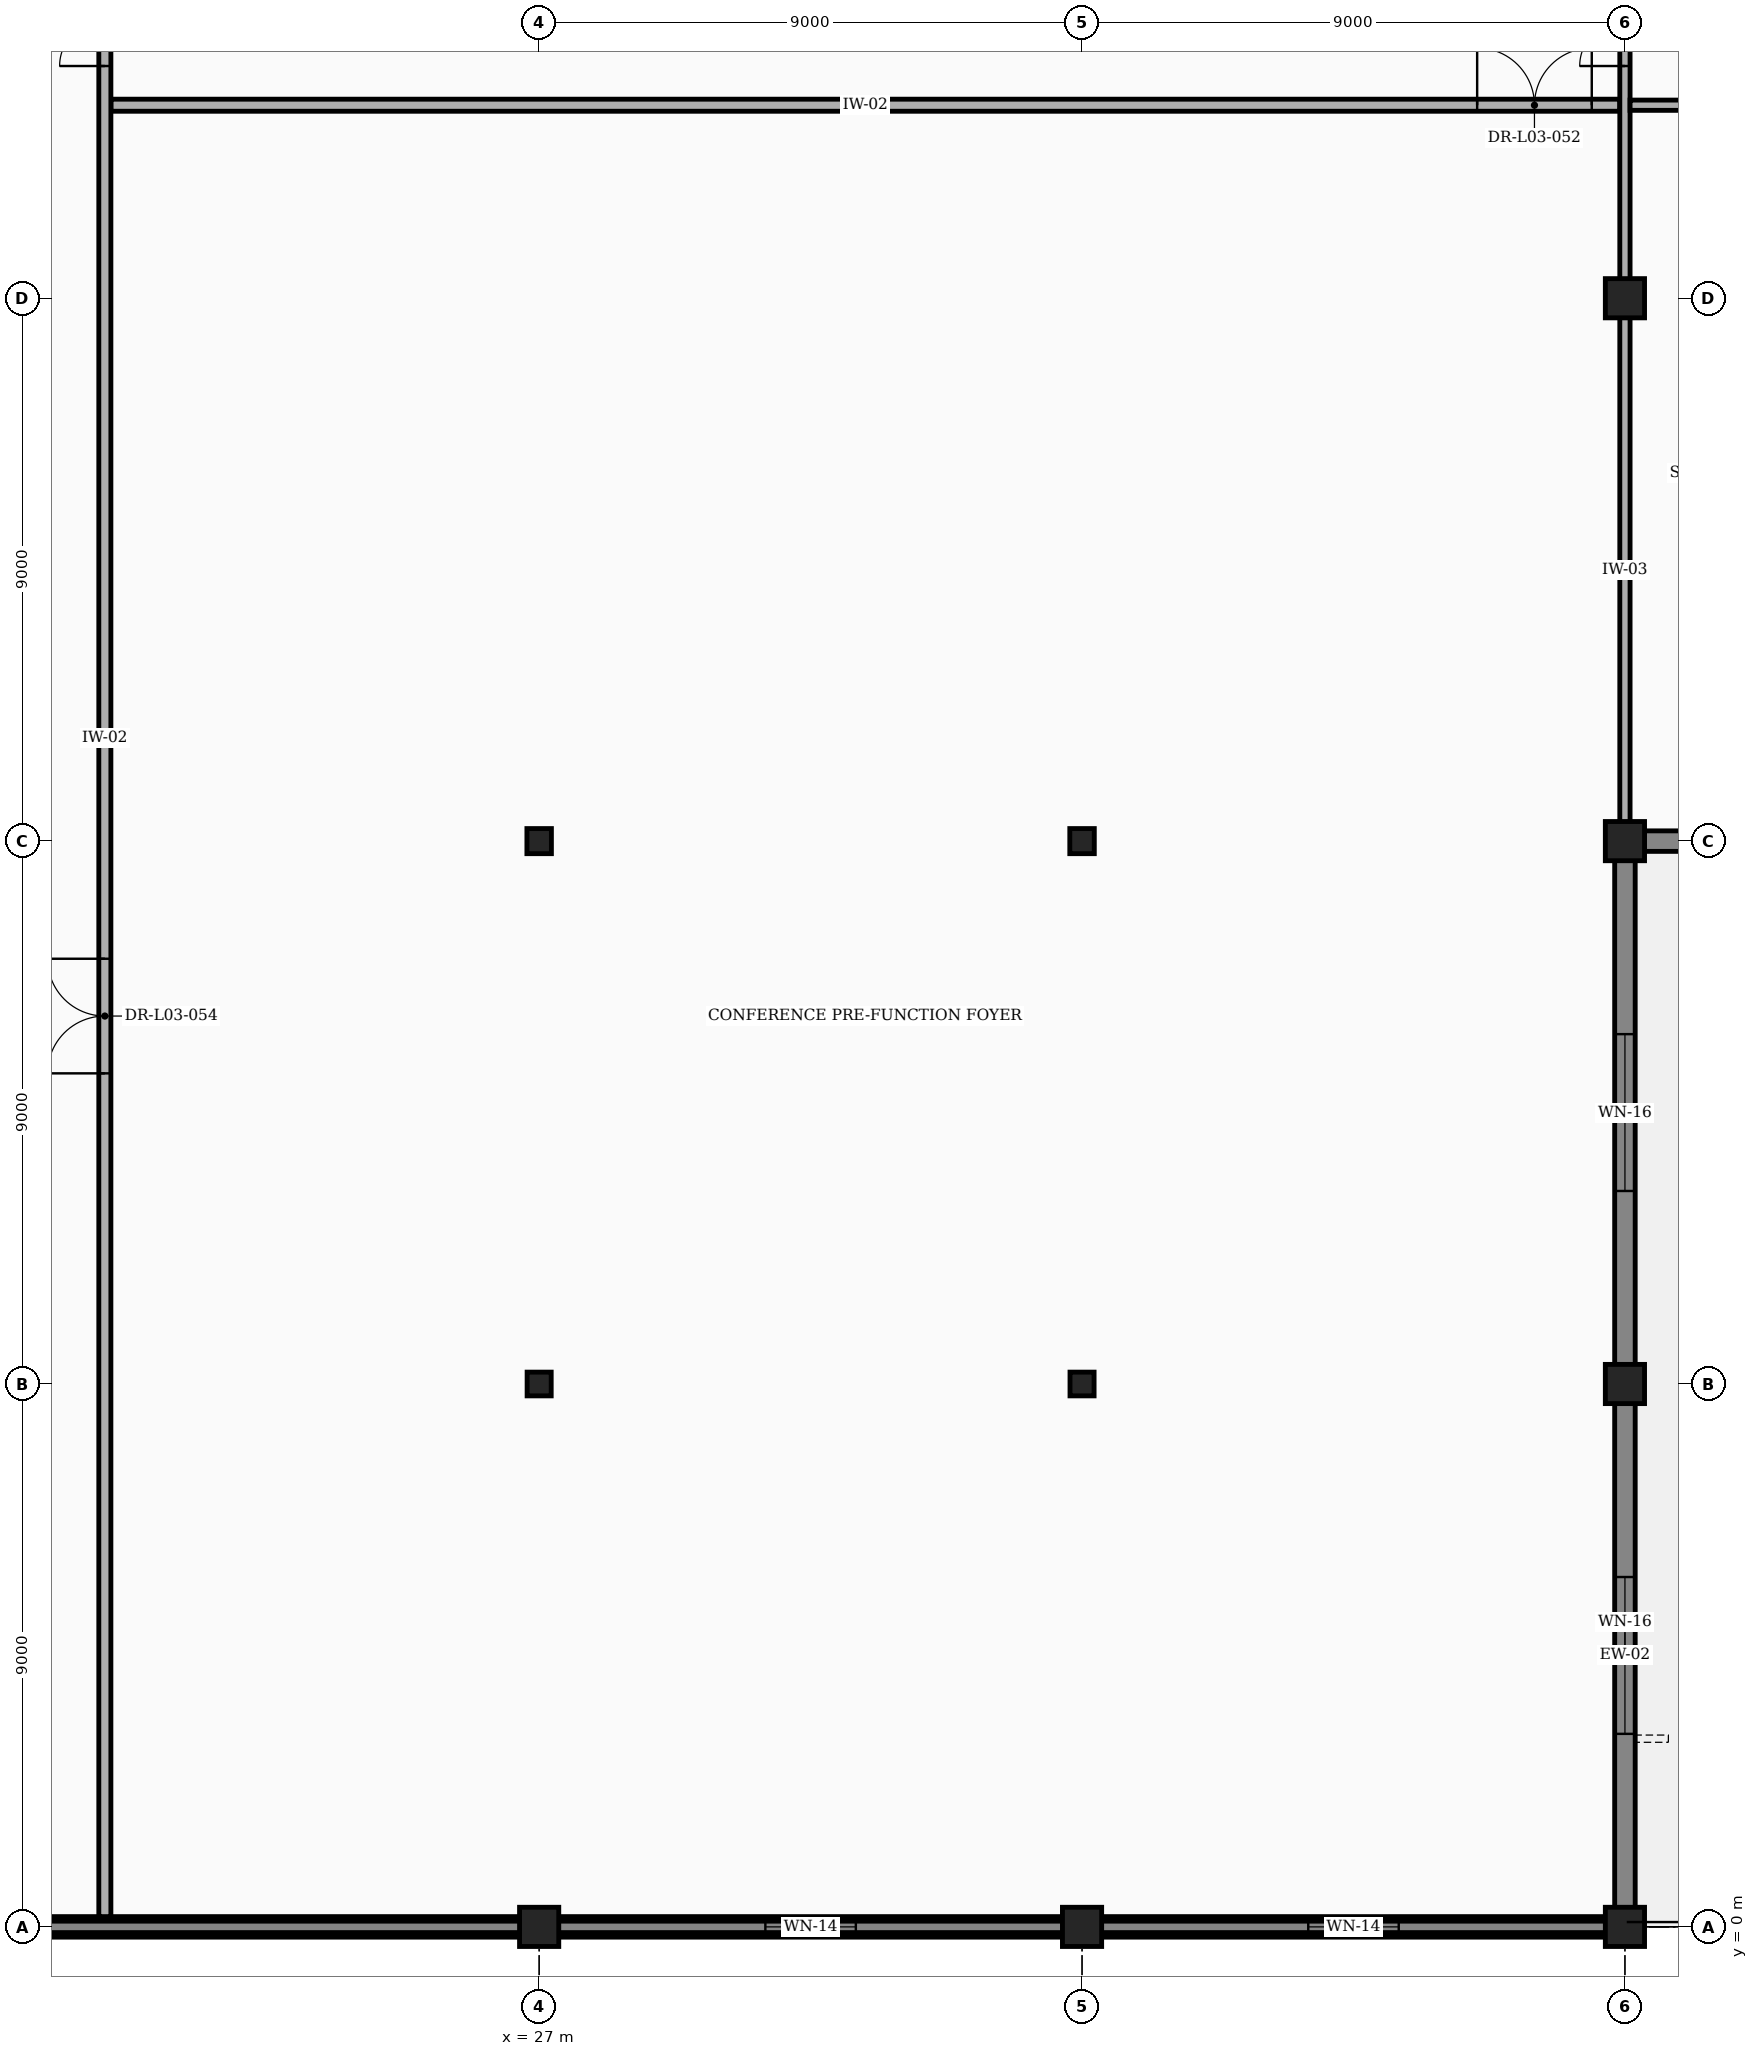
"""IFC4 building model, lengths in metres.
Left out: names, types, materials, properties, quantities, classifications, styles, units other than length and angle.
Written with IfcOpenShell. Run it as: python <this file> out.ifc"""

import sys

from ifc_helpers import new_model, si_unit, direction, frame, frame_2d, origin, origin_2d, place, context, subcontext, project, spatial, rectangle, i_section, extrude, element, fill, save


model = new_model("IFC4")
c1 = context("Model", 3, precision=1e-05, world=origin(), true_north=direction((0.0, 1.0)))
c2 = subcontext(c1, "Body", "Model", "MODEL_VIEW")
j1 = project(units=[si_unit("LENGTHUNIT", "METRE"), si_unit("PLANEANGLEUNIT", "RADIAN")], contexts=[c1])
p1 = place(None, origin())
s1 = spatial("IfcSite", under=j1, at=p1, CompositionType="ELEMENT")
p2 = place(p1, origin())
s2 = spatial("IfcBuilding", under=s1, at=p2, CompositionType="ELEMENT")
p3 = place(p2, frame((0.0, 0.0, 16.8)))
s3 = spatial("IfcBuildingStorey", under=s2, at=p3, CompositionType="ELEMENT", Elevation=16.8)
p4 = place(p3, frame((27.0, 0.0, 0.0), z_axis=(0.0, 0.0, 1.0), x_axis=(1.0, 0.0, 0.0)))
e1 = element("IfcColumn", 1, at=p4, inside=s3, PredefinedType="COLUMN", context=c2, shape_type="SweptSolid", body=[
    extrude(rectangle(XDim=0.65, YDim=0.65, at=origin_2d()), origin(), (0.0, 0.0, 1.0), 4.8),
])
p5 = place(p3, frame((27.0, 9.0, 0.0), z_axis=(0.0, 0.0, 1.0), x_axis=(1.0, 0.0, 0.0)))
e2 = element("IfcColumn", 2, at=p5, inside=s3, PredefinedType="COLUMN", context=c2, shape_type="SweptSolid", body=[
    extrude(i_section(OverallWidth=0.399, OverallDepth=0.394, WebThickness=0.023, FlangeThickness=0.037, at=origin_2d()), origin(), (0.0, 0.0, 1.0), 4.8),
])
p6 = place(p3, frame((27.0, 18.0, 0.0), z_axis=(0.0, 0.0, 1.0), x_axis=(1.0, 0.0, 0.0)))
e3 = element("IfcColumn", 3, at=p6, inside=s3, PredefinedType="COLUMN", context=c2, shape_type="SweptSolid", body=[
    extrude(i_section(OverallWidth=0.406, OverallDepth=0.416, WebThickness=0.03, FlangeThickness=0.048, at=origin_2d()), origin(), (0.0, 0.0, 1.0), 4.8),
])
p7 = place(p3, frame((36.0, 0.0, 0.0), z_axis=(0.0, 0.0, 1.0), x_axis=(1.0, 0.0, 0.0)))
e4 = element("IfcColumn", 4, at=p7, inside=s3, PredefinedType="COLUMN", context=c2, shape_type="SweptSolid", body=[
    extrude(rectangle(XDim=0.65, YDim=0.65, at=origin_2d()), origin(), (0.0, 0.0, 1.0), 4.8),
])
p8 = place(p3, frame((36.0, 9.0, 0.0), z_axis=(0.0, 0.0, 1.0), x_axis=(1.0, 0.0, 0.0)))
e5 = element("IfcColumn", 5, at=p8, inside=s3, PredefinedType="COLUMN", context=c2, shape_type="SweptSolid", body=[
    extrude(i_section(OverallWidth=0.399, OverallDepth=0.394, WebThickness=0.023, FlangeThickness=0.037, at=origin_2d()), origin(), (0.0, 0.0, 1.0), 4.8),
])
p9 = place(p3, frame((36.0, 18.0, 0.0), z_axis=(0.0, 0.0, 1.0), x_axis=(1.0, 0.0, 0.0)))
e6 = element("IfcColumn", 6, at=p9, inside=s3, PredefinedType="COLUMN", context=c2, shape_type="SweptSolid", body=[
    extrude(i_section(OverallWidth=0.406, OverallDepth=0.416, WebThickness=0.03, FlangeThickness=0.048, at=origin_2d()), origin(), (0.0, 0.0, 1.0), 4.8),
])
for number, where, z_axis, x_axis in (
    (7, (45.0, 0.0, 0.0), (0.0, 0.0, 1.0), (1.0, 0.0, 0.0)),
    (8, (45.0, 9.0, 0.0), (0.0, 0.0, 1.0), (1.0, 0.0, 0.0)),
    (9, (45.0, 18.0, 0.0), (0.0, 0.0, 1.0), (1.0, 0.0, 0.0)),
    (10, (45.0, 27.0, 0.0), (0.0, 0.0, 1.0), (1.0, 0.0, 0.0)),
):
    element("IfcColumn", number, at=place(p3, frame(where, z_axis=z_axis, x_axis=x_axis)), inside=s3, PredefinedType="COLUMN", context=c2, shape_type="SweptSolid", body=[
        extrude(rectangle(XDim=0.65, YDim=0.65, at=origin_2d()), origin(), (0.0, 0.0, 1.0), 4.8),
    ])
p10 = place(p3, frame((9.317, 0.0, 0.0), z_axis=(0.0, 0.0, 1.0), x_axis=(1.0, 0.0, 0.0)))
e11 = element("IfcWall", 11, at=p10, inside=s3, PredefinedType="STANDARD", context=c2, shape_type="SweptSolid", body=[
    extrude(rectangle(XDim=17.366, YDim=0.34, at=frame_2d((8.683, 0.0))), origin(), (0.0, 0.0, 1.0), 4.048),
])
p11 = place(p10, frame((7.933, 0.0, 0.85)))
e12 = element("IfcOpeningElement", 12, at=p11, cuts=e11, PredefinedType="OPENING", context=c2, shape_type="SweptSolid", body=[
    extrude(rectangle(XDim=1.5, YDim=1.8, at=frame_2d((0.75, 0.9))), frame((0.0, 0.182, 0.0), z_axis=(0.0, -1.0, 0.0), x_axis=(1.0, 0.0, 0.0)), (0.0, 0.0, 1.0), 0.364),
])
p12 = place(p3, frame((27.317, 0.0, 0.0), z_axis=(0.0, 0.0, 1.0), x_axis=(1.0, 0.0, 0.0)))
e13 = element("IfcWall", 13, at=p12, inside=s3, PredefinedType="STANDARD", context=c2, shape_type="SweptSolid", body=[
    extrude(rectangle(XDim=8.366, YDim=0.34, at=frame_2d((4.183, 0.0))), origin(), (0.0, 0.0, 1.0), 4.048),
])
p13 = place(p12, frame((3.433, 0.0, 0.85)))
e14 = element("IfcOpeningElement", 14, at=p13, cuts=e13, PredefinedType="OPENING", context=c2, shape_type="SweptSolid", body=[
    extrude(rectangle(XDim=1.5, YDim=1.8, at=frame_2d((0.75, 0.9))), frame((0.0, 0.182, 0.0), z_axis=(0.0, -1.0, 0.0), x_axis=(1.0, 0.0, 0.0)), (0.0, 0.0, 1.0), 0.364),
])
p14 = place(p3, frame((36.317, 0.0, 0.0), z_axis=(0.0, 0.0, 1.0), x_axis=(1.0, 0.0, 0.0)))
e15 = element("IfcWall", 15, at=p14, inside=s3, PredefinedType="STANDARD", context=c2, shape_type="SweptSolid", body=[
    extrude(rectangle(XDim=8.366, YDim=0.34, at=frame_2d((4.183, 0.0))), origin(), (0.0, 0.0, 1.0), 4.048),
])
p15 = place(p14, frame((3.433, 0.0, 0.85)))
e16 = element("IfcOpeningElement", 16, at=p15, cuts=e15, PredefinedType="OPENING", context=c2, shape_type="SweptSolid", body=[
    extrude(rectangle(XDim=1.5, YDim=1.8, at=frame_2d((0.75, 0.9))), frame((0.0, 0.182, 0.0), z_axis=(0.0, -1.0, 0.0), x_axis=(1.0, 0.0, 0.0)), (0.0, 0.0, 1.0), 0.364),
])
p16 = place(p3, frame((45.317, 18.0, 0.0), z_axis=(0.0, 0.0, 1.0), x_axis=(1.0, 0.0, 0.0)))
e17 = element("IfcWall", 17, at=p16, inside=s3, PredefinedType="STANDARD", context=c2, shape_type="SweptSolid", body=[
    extrude(rectangle(XDim=17.366, YDim=0.34, at=frame_2d((8.683, 0.0))), origin(), (0.0, 0.0, 1.0), 4.195),
])
p17 = place(p16, frame((7.933, 0.0, 0.85)))
e18 = element("IfcOpeningElement", 18, at=p17, cuts=e17, PredefinedType="OPENING", context=c2, shape_type="SweptSolid", body=[
    extrude(rectangle(XDim=1.5, YDim=1.8, at=frame_2d((0.75, 0.9))), frame((0.0, 0.182, 0.0), z_axis=(0.0, -1.0, 0.0), x_axis=(1.0, 0.0, 0.0)), (0.0, 0.0, 1.0), 0.364),
])
p18 = place(p16, frame((1.483, 0.0, 0.0)))
e19 = element("IfcOpeningElement", 19, at=p18, cuts=e17, PredefinedType="OPENING", context=c2, shape_type="SweptSolid", body=[
    extrude(rectangle(XDim=2.4, YDim=2.35, at=frame_2d((1.2, 1.175))), frame((0.0, 0.182, 0.0), z_axis=(0.0, -1.0, 0.0), x_axis=(1.0, 0.0, 0.0)), (0.0, 0.0, 1.0), 0.364),
])
p19 = place(p3, frame((45.0, 0.317, 0.0), z_axis=(0.0, 0.0, 1.0), x_axis=(0.0, 1.0, 0.0)))
e20 = element("IfcWall", 20, at=p19, inside=s3, PredefinedType="STANDARD", context=c2, shape_type="SweptSolid", body=[
    extrude(rectangle(XDim=8.366, YDim=0.34, at=frame_2d((4.183, 0.0))), origin(), (0.0, 0.0, 1.0), 4.048),
])
p20 = place(p19, frame((2.883, 0.0, 0.85)))
e21 = element("IfcOpeningElement", 21, at=p20, cuts=e20, PredefinedType="OPENING", context=c2, shape_type="SweptSolid", body=[
    extrude(rectangle(XDim=2.6, YDim=2.2, at=frame_2d((1.3, 1.1))), frame((0.0, 0.182, 0.0), z_axis=(0.0, -1.0, 0.0), x_axis=(1.0, 0.0, 0.0)), (0.0, 0.0, 1.0), 0.364),
])
p21 = place(p3, frame((45.0, 9.317, 0.0), z_axis=(0.0, 0.0, 1.0), x_axis=(0.0, 1.0, 0.0)))
e22 = element("IfcWall", 22, at=p21, inside=s3, PredefinedType="STANDARD", context=c2, shape_type="SweptSolid", body=[
    extrude(rectangle(XDim=8.366, YDim=0.34, at=frame_2d((4.183, 0.0))), origin(), (0.0, 0.0, 1.0), 4.555),
])
p22 = place(p21, frame((2.883, 0.0, 0.85)))
e23 = element("IfcOpeningElement", 23, at=p22, cuts=e22, PredefinedType="OPENING", context=c2, shape_type="SweptSolid", body=[
    extrude(rectangle(XDim=2.6, YDim=2.2, at=frame_2d((1.3, 1.1))), frame((0.0, 0.182, 0.0), z_axis=(0.0, -1.0, 0.0), x_axis=(1.0, 0.0, 0.0)), (0.0, 0.0, 1.0), 0.364),
])
p23 = place(p3, frame((0.0, 0.0, 4.8), z_axis=(0.0, 0.0, 1.0), x_axis=(1.0, 0.0, 0.0)))
e24 = element("IfcWall", 24, at=p23, inside=s3, PredefinedType="PARAPET", context=c2, shape_type="SweptSolid", body=[
    extrude(rectangle(XDim=45.0, YDim=0.19, at=frame_2d((22.5, 0.0))), origin(), (0.0, 0.0, 1.0), 1.2),
])
p24 = place(p3, frame((19.9, 30.2, 0.0), z_axis=(0.0, 0.0, 1.0), x_axis=(1.0, 0.0, 0.0)))
e25 = element("IfcWall", 25, at=p24, inside=s3, PredefinedType="PARTITIONING", context=c2, shape_type="SweptSolid", body=[
    extrude(rectangle(XDim=25.015, YDim=0.2, at=frame_2d((12.508, 0.0))), origin(), (0.0, 0.0, 1.0), 4.555),
])
p25 = place(p24, frame((22.65, 0.0, 0.0)))
e26 = element("IfcOpeningElement", 26, at=p25, cuts=e25, PredefinedType="OPENING", context=c2, shape_type="SweptSolid", body=[
    extrude(rectangle(XDim=1.9, YDim=2.35, at=frame_2d((0.95, 1.175))), frame((0.0, 0.112, 0.0), z_axis=(0.0, -1.0, 0.0), x_axis=(1.0, 0.0, 0.0)), (0.0, 0.0, 1.0), 0.224),
])
p26 = place(p3, frame((19.8, 0.17, 0.0), z_axis=(0.0, 0.0, 1.0), x_axis=(0.0, 1.0, 0.0)))
e27 = element("IfcWall", 27, at=p26, inside=s3, PredefinedType="PARTITIONING", context=c2, shape_type="SweptSolid", body=[
    extrude(rectangle(XDim=39.07, YDim=0.2, at=frame_2d((19.535, 0.0))), origin(), (0.0, 0.0, 1.0), 4.555),
])
p27 = place(p26, frame((13.98, 0.0, 0.0)))
e28 = element("IfcOpeningElement", 28, at=p27, cuts=e27, PredefinedType="OPENING", context=c2, shape_type="SweptSolid", body=[
    extrude(rectangle(XDim=1.9, YDim=2.35, at=frame_2d((0.95, 1.175))), frame((0.0, 0.112, 0.0), z_axis=(0.0, -1.0, 0.0), x_axis=(1.0, 0.0, 0.0)), (0.0, 0.0, 1.0), 0.224),
])
p28 = place(p26, frame((30.68, 0.0, 0.0)))
e29 = element("IfcOpeningElement", 29, at=p28, cuts=e27, PredefinedType="OPENING", context=c2, shape_type="SweptSolid", body=[
    extrude(rectangle(XDim=1.5, YDim=2.2, at=frame_2d((0.75, 1.1))), frame((0.0, 0.112, 0.0), z_axis=(0.0, -1.0, 0.0), x_axis=(1.0, 0.0, 0.0)), (0.0, 0.0, 1.0), 0.224),
])
p29 = place(p26, frame((36.68, 0.0, 0.0)))
e30 = element("IfcOpeningElement", 30, at=p29, cuts=e27, PredefinedType="OPENING", context=c2, shape_type="SweptSolid", body=[
    extrude(rectangle(XDim=1.9, YDim=2.35, at=frame_2d((0.95, 1.175))), frame((0.0, 0.112, 0.0), z_axis=(0.0, -1.0, 0.0), x_axis=(1.0, 0.0, 0.0)), (0.0, 0.0, 1.0), 0.224),
])
p30 = place(p3, frame((45.0, 18.22, 0.0), z_axis=(0.0, 0.0, 1.0), x_axis=(0.0, 1.0, 0.0)))
e31 = element("IfcWall", 31, at=p30, inside=s3, PredefinedType="PARTITIONING", context=c2, shape_type="SweptSolid", body=[
    extrude(rectangle(XDim=8.56, YDim=0.17, at=frame_2d((4.28, 0.0))), origin(), (0.0, 0.0, 1.0), 4.002),
])
p31 = place(p3, frame((45.0, 27.22, 0.0), z_axis=(0.0, 0.0, 1.0), x_axis=(0.0, 1.0, 0.0)))
e32 = element("IfcWall", 32, at=p31, inside=s3, PredefinedType="PARTITIONING", context=c2, shape_type="SweptSolid", body=[
    extrude(rectangle(XDim=8.56, YDim=0.17, at=frame_2d((4.28, 0.0))), origin(), (0.0, 0.0, 1.0), 4.258),
])
p32 = place(p31, frame((3.63, 0.0, 0.0)))
e33 = element("IfcOpeningElement", 33, at=p32, cuts=e32, PredefinedType="OPENING", context=c2, shape_type="SweptSolid", body=[
    extrude(rectangle(XDim=1.5, YDim=2.2, at=frame_2d((0.75, 1.1))), frame((0.0, 0.097, 0.0), z_axis=(0.0, -1.0, 0.0), x_axis=(1.0, 0.0, 0.0)), (0.0, 0.0, 1.0), 0.194),
])
p33 = place(p3, frame((45.085, 30.2, 0.0), z_axis=(0.0, 0.0, 1.0), x_axis=(1.0, 0.0, 0.0)))
e34 = element("IfcWall", 34, at=p33, inside=s3, PredefinedType="PARTITIONING", context=c2, shape_type="SweptSolid", body=[
    extrude(rectangle(XDim=5.755, YDim=0.17, at=frame_2d((2.877, 0.0))), origin(), (0.0, 0.0, 1.0), 4.555),
])
p34 = place(p33, frame((1.928, 0.0, 0.0)))
e35 = element("IfcOpeningElement", 35, at=p34, cuts=e34, PredefinedType="OPENING", context=c2, shape_type="SweptSolid", body=[
    extrude(rectangle(XDim=1.9, YDim=2.35, at=frame_2d((0.95, 1.175))), frame((0.0, 0.097, 0.0), z_axis=(0.0, -1.0, 0.0), x_axis=(1.0, 0.0, 0.0)), (0.0, 0.0, 1.0), 0.194),
])
p35 = place(p13, origin())
e36 = element("IfcWindow", 36, at=p35, inside=s3, PartitioningType="SINGLE_PANEL", PredefinedType="WINDOW", context=c2, shape_type="SweptSolid", body=[
    extrude(rectangle(XDim=1.5, YDim=1.8, at=frame_2d((0.75, 0.9))), frame((0.0, 0.03, 0.0), z_axis=(0.0, -1.0, 0.0), x_axis=(1.0, 0.0, 0.0)), (0.0, 0.0, 1.0), 0.06),
])
fill(e14, e36)
p36 = place(p15, origin())
e37 = element("IfcWindow", 37, at=p36, inside=s3, PartitioningType="SINGLE_PANEL", PredefinedType="WINDOW", context=c2, shape_type="SweptSolid", body=[
    extrude(rectangle(XDim=1.5, YDim=1.8, at=frame_2d((0.75, 0.9))), frame((0.0, 0.03, 0.0), z_axis=(0.0, -1.0, 0.0), x_axis=(1.0, 0.0, 0.0)), (0.0, 0.0, 1.0), 0.06),
])
fill(e16, e37)
p37 = place(p20, origin())
e38 = element("IfcWindow", 38, at=p37, inside=s3, PartitioningType="SINGLE_PANEL", PredefinedType="WINDOW", context=c2, shape_type="SweptSolid", body=[
    extrude(rectangle(XDim=2.6, YDim=2.2, at=frame_2d((1.3, 1.1))), frame((0.0, 0.03, 0.0), z_axis=(0.0, -1.0, 0.0), x_axis=(1.0, 0.0, 0.0)), (0.0, 0.0, 1.0), 0.06),
])
fill(e21, e38)
p38 = place(p22, origin())
e39 = element("IfcWindow", 39, at=p38, inside=s3, PartitioningType="SINGLE_PANEL", PredefinedType="WINDOW", context=c2, shape_type="SweptSolid", body=[
    extrude(rectangle(XDim=2.6, YDim=2.2, at=frame_2d((1.3, 1.1))), frame((0.0, 0.03, 0.0), z_axis=(0.0, -1.0, 0.0), x_axis=(1.0, 0.0, 0.0)), (0.0, 0.0, 1.0), 0.06),
])
fill(e23, e39)
p39 = place(p25, origin())
e40 = element("IfcDoor", 40, at=p39, inside=s3, OperationType="DOUBLE_DOOR_SINGLE_SWING", PredefinedType="DOOR", context=c2, shape_type="SweptSolid", body=[
    extrude(rectangle(XDim=1.9, YDim=2.35, at=frame_2d((0.95, 1.175))), frame((0.0, 0.025, 0.0), z_axis=(0.0, -1.0, 0.0), x_axis=(1.0, 0.0, 0.0)), (0.0, 0.0, 1.0), 0.05),
])
fill(e26, e40)
p40 = place(p27, origin())
e41 = element("IfcDoor", 41, at=p40, inside=s3, OperationType="DOUBLE_DOOR_SINGLE_SWING", PredefinedType="DOOR", context=c2, shape_type="SweptSolid", body=[
    extrude(rectangle(XDim=1.9, YDim=2.35, at=frame_2d((0.95, 1.175))), frame((0.0, 0.025, 0.0), z_axis=(0.0, -1.0, 0.0), x_axis=(1.0, 0.0, 0.0)), (0.0, 0.0, 1.0), 0.05),
])
fill(e28, e41)
p41 = place(p28, origin())
e42 = element("IfcDoor", 42, at=p41, inside=s3, OperationType="DOUBLE_DOOR_SINGLE_SWING", PredefinedType="DOOR", context=c2, shape_type="SweptSolid", body=[
    extrude(rectangle(XDim=1.5, YDim=2.2, at=frame_2d((0.75, 1.1))), frame((0.0, 0.025, 0.0), z_axis=(0.0, -1.0, 0.0), x_axis=(1.0, 0.0, 0.0)), (0.0, 0.0, 1.0), 0.05),
])
fill(e29, e42)
p42 = place(p32, origin())
e43 = element("IfcDoor", 43, at=p42, inside=s3, OperationType="DOUBLE_DOOR_SINGLE_SWING", PredefinedType="DOOR", context=c2, shape_type="SweptSolid", body=[
    extrude(rectangle(XDim=1.5, YDim=2.2, at=frame_2d((0.75, 1.1))), frame((0.0, 0.025, 0.0), z_axis=(0.0, -1.0, 0.0), x_axis=(1.0, 0.0, 0.0)), (0.0, 0.0, 1.0), 0.05),
])
fill(e33, e43)
save(model, sys.argv[1])
